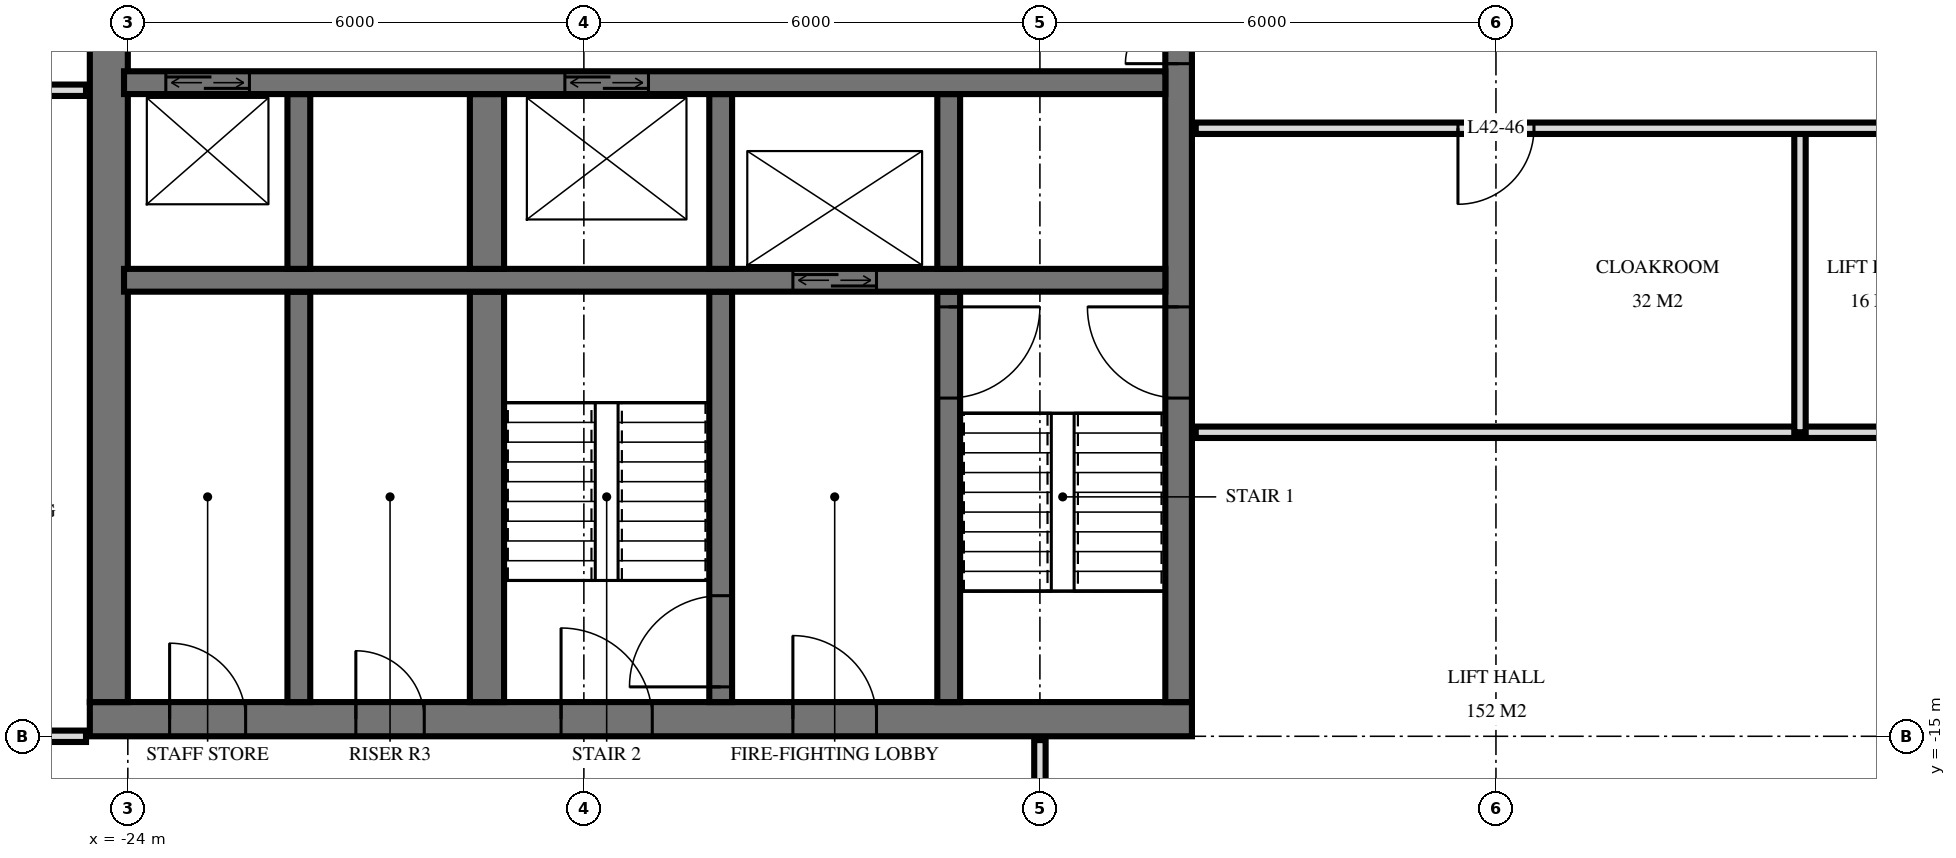
"""IFC4 building model, lengths in metres.
Left out: names, types, materials, properties, quantities, classifications, styles, units other than length and angle.
Written with IfcOpenShell. Run it as: python <this file> out.ifc"""

import sys

from ifc_helpers import new_model, si_unit, direction, frame, frame_2d, origin, place, context, subcontext, project, spatial, rectangle, extrude, element, fill, save


model = new_model("IFC4")
c1 = context("Model", 3, precision=1e-05, world=origin(), true_north=direction((0.0, 1.0)))
c2 = subcontext(c1, "Body", "Model", "MODEL_VIEW")
j1 = project(units=[si_unit("LENGTHUNIT", "METRE"), si_unit("PLANEANGLEUNIT", "RADIAN")], contexts=[c1])
p1 = place(None, origin())
s1 = spatial("IfcSite", under=j1, at=p1, CompositionType="ELEMENT")
p2 = place(p1, origin())
s2 = spatial("IfcBuilding", under=s1, at=p2, CompositionType="ELEMENT")
p3 = place(p2, frame((0.0, 0.0, 163.2)))
s3 = spatial("IfcBuildingStorey", under=s2, at=p3, CompositionType="ELEMENT", Elevation=163.2)
p4 = place(p3, frame((-24.5, -14.775, 0.0), z_axis=(0.0, 0.0, 1.0), x_axis=(1.0, 0.0, 0.0)))
e1 = element("IfcWall", 1, at=p4, inside=s3, PredefinedType="SHEAR", context=c2, shape_type="SweptSolid", body=[
    extrude(rectangle(XDim=14.5, YDim=0.45, at=frame_2d((7.25, 0.0))), origin(), (0.0, 0.0, 1.0), 3.6),
])
p5 = place(p4, frame((6.2, 0.0, 0.0)))
e2 = element("IfcOpeningElement", 2, at=p5, cuts=e1, PredefinedType="OPENING", context=c2, shape_type="SweptSolid", body=[
    extrude(rectangle(XDim=1.2, YDim=2.1, at=frame_2d((0.6, 1.05))), frame((0.0, 0.235, 0.0), z_axis=(0.0, -1.0, 0.0), x_axis=(1.0, 0.0, 0.0)), (0.0, 0.0, 1.0), 0.47),
])
p6 = place(p4, frame((9.25, 0.0, 0.0)))
e3 = element("IfcOpeningElement", 3, at=p6, cuts=e1, PredefinedType="OPENING", context=c2, shape_type="SweptSolid", body=[
    extrude(rectangle(XDim=1.1, YDim=2.1, at=frame_2d((0.55, 1.05))), frame((0.0, 0.235, 0.0), z_axis=(0.0, -1.0, 0.0), x_axis=(1.0, 0.0, 0.0)), (0.0, 0.0, 1.0), 0.47),
])
p7 = place(p4, frame((3.5, 0.0, 0.0)))
e4 = element("IfcOpeningElement", 4, at=p7, cuts=e1, PredefinedType="OPENING", context=c2, shape_type="SweptSolid", body=[
    extrude(rectangle(XDim=0.9, YDim=2.1, at=frame_2d((0.45, 1.05))), frame((0.0, 0.235, 0.0), z_axis=(0.0, -1.0, 0.0), x_axis=(1.0, 0.0, 0.0)), (0.0, 0.0, 1.0), 0.47),
])
p8 = place(p4, frame((1.05, 0.0, 0.0)))
e5 = element("IfcOpeningElement", 5, at=p8, cuts=e1, PredefinedType="OPENING", context=c2, shape_type="SweptSolid", body=[
    extrude(rectangle(XDim=1.0, YDim=2.1, at=frame_2d((0.5, 1.05))), frame((0.0, 0.235, 0.0), z_axis=(0.0, -1.0, 0.0), x_axis=(1.0, 0.0, 0.0)), (0.0, 0.0, 1.0), 0.47),
])
p9 = place(p3, frame((-10.175, -14.55, 0.0), z_axis=(0.0, 0.0, 1.0), x_axis=(0.0, 1.0, 0.0)))
e6 = element("IfcWall", 6, at=p9, inside=s3, PredefinedType="SHEAR", context=c2, shape_type="SweptSolid", body=[
    extrude(rectangle(XDim=14.1, YDim=0.35, at=frame_2d((7.05, 0.0))), origin(), (0.0, 0.0, 1.0), 3.6),
])
p10 = place(p9, frame((8.4, 0.0, 0.0)))
e7 = element("IfcOpeningElement", 7, at=p10, cuts=e6, PredefinedType="OPENING", context=c2, shape_type="SweptSolid", body=[
    extrude(rectangle(XDim=1.4, YDim=2.4, at=frame_2d((0.7, 1.2))), frame((0.0, 0.185, 0.0), z_axis=(0.0, -1.0, 0.0), x_axis=(1.0, 0.0, 0.0)), (0.0, 0.0, 1.0), 0.37),
])
p11 = place(p9, frame((10.0, 0.0, 0.0)))
e8 = element("IfcOpeningElement", 8, at=p11, cuts=e6, PredefinedType="OPENING", context=c2, shape_type="SweptSolid", body=[
    extrude(rectangle(XDim=1.4, YDim=2.4, at=frame_2d((0.7, 1.2))), frame((0.0, 0.185, 0.0), z_axis=(0.0, -1.0, 0.0), x_axis=(1.0, 0.0, 0.0)), (0.0, 0.0, 1.0), 0.37),
])
p12 = place(p9, frame((4.0, 0.0, 0.0)))
e9 = element("IfcOpeningElement", 9, at=p12, cuts=e6, PredefinedType="OPENING", context=c2, shape_type="SweptSolid", body=[
    extrude(rectangle(XDim=1.2, YDim=2.1, at=frame_2d((0.6, 1.05))), frame((0.0, 0.185, 0.0), z_axis=(0.0, -1.0, 0.0), x_axis=(1.0, 0.0, 0.0)), (0.0, 0.0, 1.0), 0.37),
])
p13 = place(p3, frame((-24.25, -14.55, 0.0), z_axis=(0.0, 0.0, 1.0), x_axis=(0.0, 1.0, 0.0)))
e10 = element("IfcWall", 10, at=p13, inside=s3, PredefinedType="SHEAR", context=c2, shape_type="SweptSolid", body=[
    extrude(rectangle(XDim=14.1, YDim=0.5, at=frame_2d((7.05, 0.0))), origin(), (0.0, 0.0, 1.0), 3.6),
])
p14 = place(p3, frame((-24.05, -6.4, 0.0), z_axis=(0.0, 0.0, 1.0), x_axis=(1.0, 0.0, 0.0)))
e11 = element("IfcWall", 11, at=p14, inside=s3, PredefinedType="SHEAR", context=c2, shape_type="SweptSolid", body=[
    extrude(rectangle(XDim=13.7, YDim=0.3, at=frame_2d((6.85, 0.0))), origin(), (0.0, 0.0, 1.0), 3.6),
])
p15 = place(p14, frame((0.55, 0.0, 0.0)))
e12 = element("IfcOpeningElement", 12, at=p15, cuts=e11, PredefinedType="OPENING", context=c2, shape_type="SweptSolid", body=[
    extrude(rectangle(XDim=1.1, YDim=2.1, at=frame_2d((0.55, 1.05))), frame((0.0, 0.16, 0.0), z_axis=(0.0, -1.0, 0.0), x_axis=(1.0, 0.0, 0.0)), (0.0, 0.0, 1.0), 0.32),
])
p16 = place(p14, frame((5.8, 0.0, 0.0)))
e13 = element("IfcOpeningElement", 13, at=p16, cuts=e11, PredefinedType="OPENING", context=c2, shape_type="SweptSolid", body=[
    extrude(rectangle(XDim=1.1, YDim=2.1, at=frame_2d((0.55, 1.05))), frame((0.0, 0.16, 0.0), z_axis=(0.0, -1.0, 0.0), x_axis=(1.0, 0.0, 0.0)), (0.0, 0.0, 1.0), 0.32),
])
p17 = place(p3, frame((-24.05, -9.0, 0.0), z_axis=(0.0, 0.0, 1.0), x_axis=(1.0, 0.0, 0.0)))
e14 = element("IfcWall", 14, at=p17, inside=s3, PredefinedType="SHEAR", context=c2, shape_type="SweptSolid", body=[
    extrude(rectangle(XDim=13.7, YDim=0.3, at=frame_2d((6.85, 0.0))), origin(), (0.0, 0.0, 1.0), 3.6),
])
p18 = place(p17, frame((8.8, 0.0, 0.0)))
e15 = element("IfcOpeningElement", 15, at=p18, cuts=e14, PredefinedType="OPENING", context=c2, shape_type="SweptSolid", body=[
    extrude(rectangle(XDim=1.1, YDim=2.1, at=frame_2d((0.55, 1.05))), frame((0.0, 0.16, 0.0), z_axis=(0.0, -1.0, 0.0), x_axis=(1.0, 0.0, 0.0)), (0.0, 0.0, 1.0), 0.32),
])
p19 = place(p3, frame((-13.2, -8.85, 0.0), z_axis=(0.0, 0.0, 1.0), x_axis=(0.0, 1.0, 0.0)))
e16 = element("IfcWall", 16, at=p19, inside=s3, PredefinedType="SHEAR", context=c2, shape_type="SweptSolid", body=[
    extrude(rectangle(XDim=2.3, YDim=0.3, at=frame_2d((1.15, 0.0))), origin(), (0.0, 0.0, 1.0), 3.6),
])
p20 = place(p3, frame((-13.2, -14.55, 0.0), z_axis=(0.0, 0.0, 1.0), x_axis=(0.0, 1.0, 0.0)))
e17 = element("IfcWall", 17, at=p20, inside=s3, PredefinedType="SHEAR", context=c2, shape_type="SweptSolid", body=[
    extrude(rectangle(XDim=5.4, YDim=0.3, at=frame_2d((2.7, 0.0))), origin(), (0.0, 0.0, 1.0), 3.6),
])
p21 = place(p20, frame((4.0, 0.0, 0.0)))
e18 = element("IfcOpeningElement", 18, at=p21, cuts=e17, PredefinedType="OPENING", context=c2, shape_type="SweptSolid", body=[
    extrude(rectangle(XDim=1.2, YDim=2.1, at=frame_2d((0.6, 1.05))), frame((0.0, 0.16, 0.0), z_axis=(0.0, -1.0, 0.0), x_axis=(1.0, 0.0, 0.0)), (0.0, 0.0, 1.0), 0.32),
])
p22 = place(p3, frame((-16.2, -8.85, 0.0), z_axis=(0.0, 0.0, 1.0), x_axis=(0.0, 1.0, 0.0)))
e19 = element("IfcWall", 19, at=p22, inside=s3, PredefinedType="SHEAR", context=c2, shape_type="SweptSolid", body=[
    extrude(rectangle(XDim=2.3, YDim=0.3, at=frame_2d((1.15, 0.0))), origin(), (0.0, 0.0, 1.0), 3.6),
])
p23 = place(p3, frame((-16.2, -14.55, 0.0), z_axis=(0.0, 0.0, 1.0), x_axis=(0.0, 1.0, 0.0)))
e20 = element("IfcWall", 20, at=p23, inside=s3, PredefinedType="SHEAR", context=c2, shape_type="SweptSolid", body=[
    extrude(rectangle(XDim=5.4, YDim=0.3, at=frame_2d((2.7, 0.0))), origin(), (0.0, 0.0, 1.0), 3.6),
])
p24 = place(p23, frame((0.2, 0.0, 0.0)))
e21 = element("IfcOpeningElement", 21, at=p24, cuts=e20, PredefinedType="OPENING", context=c2, shape_type="SweptSolid", body=[
    extrude(rectangle(XDim=1.2, YDim=2.1, at=frame_2d((0.6, 1.05))), frame((0.0, 0.16, 0.0), z_axis=(0.0, -1.0, 0.0), x_axis=(1.0, 0.0, 0.0)), (0.0, 0.0, 1.0), 0.32),
])
p25 = place(p3, frame((-19.275, -8.85, 0.0), z_axis=(0.0, 0.0, 1.0), x_axis=(0.0, 1.0, 0.0)))
e22 = element("IfcWall", 22, at=p25, inside=s3, PredefinedType="SHEAR", context=c2, shape_type="SweptSolid", body=[
    extrude(rectangle(XDim=2.3, YDim=0.45, at=frame_2d((1.15, 0.0))), origin(), (0.0, 0.0, 1.0), 3.6),
])
p26 = place(p3, frame((-19.275, -14.55, 0.0), z_axis=(0.0, 0.0, 1.0), x_axis=(0.0, 1.0, 0.0)))
e23 = element("IfcWall", 23, at=p26, inside=s3, PredefinedType="SHEAR", context=c2, shape_type="SweptSolid", body=[
    extrude(rectangle(XDim=5.4, YDim=0.45, at=frame_2d((2.7, 0.0))), origin(), (0.0, 0.0, 1.0), 3.6),
])
p27 = place(p3, frame((-21.75, -8.85, 0.0), z_axis=(0.0, 0.0, 1.0), x_axis=(0.0, 1.0, 0.0)))
e24 = element("IfcWall", 24, at=p27, inside=s3, PredefinedType="SHEAR", context=c2, shape_type="SweptSolid", body=[
    extrude(rectangle(XDim=2.3, YDim=0.3, at=frame_2d((1.15, 0.0))), origin(), (0.0, 0.0, 1.0), 3.6),
])
p28 = place(p3, frame((-21.75, -14.55, 0.0), z_axis=(0.0, 0.0, 1.0), x_axis=(0.0, 1.0, 0.0)))
e25 = element("IfcWall", 25, at=p28, inside=s3, PredefinedType="SHEAR", context=c2, shape_type="SweptSolid", body=[
    extrude(rectangle(XDim=5.4, YDim=0.3, at=frame_2d((2.7, 0.0))), origin(), (0.0, 0.0, 1.0), 3.6),
])
p29 = place(p3, frame((-2.0, -11.0, 0.0), z_axis=(0.0, 0.0, 1.0), x_axis=(0.0, 1.0, 0.0)))
e26 = element("IfcWall", 26, at=p29, inside=s3, PredefinedType="PARTITIONING", context=c2, shape_type="SweptSolid", body=[
    extrude(rectangle(XDim=4.0, YDim=0.15, at=frame_2d((2.0, 0.0))), origin(), (0.0, 0.0, 1.0), 3.32),
])
p30 = place(p3, frame((-12.0, -21.0, 0.0), z_axis=(0.0, 0.0, 1.0), x_axis=(0.0, 1.0, 0.0)))
e27 = element("IfcWall", 27, at=p30, inside=s3, PredefinedType="PARTITIONING", context=c2, shape_type="SweptSolid", body=[
    extrude(rectangle(XDim=5.95, YDim=0.15, at=frame_2d((2.975, 0.0))), origin(), (0.0, 0.0, 1.0), 3.32),
])
p31 = place(p30, frame((4.0, 0.0, 0.0)))
e28 = element("IfcOpeningElement", 28, at=p31, cuts=e27, PredefinedType="OPENING", context=c2, shape_type="SweptSolid", body=[
    extrude(rectangle(XDim=1.0, YDim=2.1, at=frame_2d((0.5, 1.05))), frame((0.0, 0.085, 0.0), z_axis=(0.0, -1.0, 0.0), x_axis=(1.0, 0.0, 0.0)), (0.0, 0.0, 1.0), 0.17),
])
p32 = place(p3, frame((-28.02, -15.0, 0.0), z_axis=(0.0, 0.0, 1.0), x_axis=(1.0, 0.0, 0.0)))
e29 = element("IfcWall", 29, at=p32, inside=s3, PredefinedType="PARTITIONING", context=c2, shape_type="SweptSolid", body=[
    extrude(rectangle(XDim=3.47, YDim=0.15, at=frame_2d((1.735, 0.0))), origin(), (0.0, 0.0, 1.0), 3.32),
])
p33 = place(p32, frame((1.57, 0.0, 0.0)))
e30 = element("IfcOpeningElement", 30, at=p33, cuts=e29, PredefinedType="OPENING", context=c2, shape_type="SweptSolid", body=[
    extrude(rectangle(XDim=1.0, YDim=2.1, at=frame_2d((0.5, 1.05))), frame((0.0, 0.085, 0.0), z_axis=(0.0, -1.0, 0.0), x_axis=(1.0, 0.0, 0.0)), (0.0, 0.0, 1.0), 0.17),
])
p34 = place(p3, frame((-9.95, -11.0, 0.0), z_axis=(0.0, 0.0, 1.0), x_axis=(1.0, 0.0, 0.0)))
e31 = element("IfcWall", 31, at=p34, inside=s3, PredefinedType="PARTITIONING", context=c2, shape_type="SweptSolid", body=[
    extrude(rectangle(XDim=19.9, YDim=0.15, at=frame_2d((9.95, 0.0))), origin(), (0.0, 0.0, 1.0), 3.32),
])
p35 = place(p34, frame((9.45, 0.0, 0.0)))
e32 = element("IfcOpeningElement", 32, at=p35, cuts=e31, PredefinedType="OPENING", context=c2, shape_type="SweptSolid", body=[
    extrude(rectangle(XDim=1.0, YDim=2.1, at=frame_2d((0.5, 1.05))), frame((0.0, 0.085, 0.0), z_axis=(0.0, -1.0, 0.0), x_axis=(1.0, 0.0, 0.0)), (0.0, 0.0, 1.0), 0.17),
])
p36 = place(p34, frame((15.45, 0.0, 0.0)))
e33 = element("IfcOpeningElement", 33, at=p36, cuts=e31, PredefinedType="OPENING", context=c2, shape_type="SweptSolid", body=[
    extrude(rectangle(XDim=1.0, YDim=2.1, at=frame_2d((0.5, 1.05))), frame((0.0, 0.085, 0.0), z_axis=(0.0, -1.0, 0.0), x_axis=(1.0, 0.0, 0.0)), (0.0, 0.0, 1.0), 0.17),
])
p37 = place(p3, frame((-9.95, -7.0, 0.0), z_axis=(0.0, 0.0, 1.0), x_axis=(1.0, 0.0, 0.0)))
e34 = element("IfcWall", 34, at=p37, inside=s3, PredefinedType="PARTITIONING", context=c2, shape_type="SweptSolid", body=[
    extrude(rectangle(XDim=19.9, YDim=0.15, at=frame_2d((9.95, 0.0))), origin(), (0.0, 0.0, 1.0), 3.32),
])
p38 = place(p37, frame((9.45, 0.0, 0.0)))
e35 = element("IfcOpeningElement", 35, at=p38, cuts=e34, PredefinedType="OPENING", context=c2, shape_type="SweptSolid", body=[
    extrude(rectangle(XDim=1.0, YDim=2.1, at=frame_2d((0.5, 1.05))), frame((0.0, 0.085, 0.0), z_axis=(0.0, -1.0, 0.0), x_axis=(1.0, 0.0, 0.0)), (0.0, 0.0, 1.0), 0.17),
])
p39 = place(p37, frame((3.45, 0.0, 0.0)))
e36 = element("IfcOpeningElement", 36, at=p39, cuts=e34, PredefinedType="OPENING", context=c2, shape_type="SweptSolid", body=[
    extrude(rectangle(XDim=1.0, YDim=2.1, at=frame_2d((0.5, 1.05))), frame((0.0, 0.085, 0.0), z_axis=(0.0, -1.0, 0.0), x_axis=(1.0, 0.0, 0.0)), (0.0, 0.0, 1.0), 0.17),
])
p40 = place(p3, frame((-28.02, -6.5, 0.0), z_axis=(0.0, 0.0, 1.0), x_axis=(1.0, 0.0, 0.0)))
e37 = element("IfcWall", 37, at=p40, inside=s3, PredefinedType="PARTITIONING", context=c2, shape_type="SweptSolid", body=[
    extrude(rectangle(XDim=3.47, YDim=0.15, at=frame_2d((1.735, 0.0))), origin(), (0.0, 0.0, 1.0), 3.32),
])
p41 = place(p40, frame((1.22, 0.0, 0.0)))
e38 = element("IfcOpeningElement", 38, at=p41, cuts=e37, PredefinedType="OPENING", context=c2, shape_type="SweptSolid", body=[
    extrude(rectangle(XDim=0.9, YDim=2.1, at=frame_2d((0.45, 1.05))), frame((0.0, 0.085, 0.0), z_axis=(0.0, -1.0, 0.0), x_axis=(1.0, 0.0, 0.0)), (0.0, 0.0, 1.0), 0.17),
])
p42 = place(p15, origin())
e39 = element("IfcDoor", 39, at=p42, inside=s3, OperationType="DOUBLE_DOOR_SLIDING", PredefinedType="USERDEFINED", context=c2, shape_type="SweptSolid", body=[
    extrude(rectangle(XDim=1.1, YDim=2.1, at=frame_2d((0.55, 1.05))), frame((0.0, 0.025, 0.0), z_axis=(0.0, -1.0, 0.0), x_axis=(1.0, 0.0, 0.0)), (0.0, 0.0, 1.0), 0.05),
])
fill(e12, e39)
p43 = place(p18, origin())
e40 = element("IfcDoor", 40, at=p43, inside=s3, OperationType="DOUBLE_DOOR_SLIDING", PredefinedType="USERDEFINED", context=c2, shape_type="SweptSolid", body=[
    extrude(rectangle(XDim=1.1, YDim=2.1, at=frame_2d((0.55, 1.05))), frame((0.0, 0.025, 0.0), z_axis=(0.0, -1.0, 0.0), x_axis=(1.0, 0.0, 0.0)), (0.0, 0.0, 1.0), 0.05),
])
fill(e15, e40)
p44 = place(p16, origin())
e41 = element("IfcDoor", 41, at=p44, inside=s3, OperationType="DOUBLE_DOOR_SLIDING", PredefinedType="USERDEFINED", context=c2, shape_type="SweptSolid", body=[
    extrude(rectangle(XDim=1.1, YDim=2.1, at=frame_2d((0.55, 1.05))), frame((0.0, 0.025, 0.0), z_axis=(0.0, -1.0, 0.0), x_axis=(1.0, 0.0, 0.0)), (0.0, 0.0, 1.0), 0.05),
])
fill(e13, e41)
p45 = place(p10, origin())
e42 = element("IfcDoor", 42, at=p45, inside=s3, OperationType="DOUBLE_DOOR_SINGLE_SWING", PredefinedType="DOOR", context=c2, shape_type="SweptSolid", body=[
    extrude(rectangle(XDim=1.4, YDim=2.4, at=frame_2d((0.7, 1.2))), frame((0.0, 0.025, 0.0), z_axis=(0.0, -1.0, 0.0), x_axis=(1.0, 0.0, 0.0)), (0.0, 0.0, 1.0), 0.05),
])
fill(e7, e42)
p46 = place(p12, origin())
e43 = element("IfcDoor", 43, at=p46, inside=s3, OperationType="SINGLE_SWING_LEFT", PredefinedType="DOOR", context=c2, shape_type="SweptSolid", body=[
    extrude(rectangle(XDim=1.2, YDim=2.1, at=frame_2d((0.6, 1.05))), frame((0.0, 0.025, 0.0), z_axis=(0.0, -1.0, 0.0), x_axis=(1.0, 0.0, 0.0)), (0.0, 0.0, 1.0), 0.05),
])
fill(e9, e43)
p47 = place(p5, origin())
e44 = element("IfcDoor", 44, at=p47, inside=s3, OperationType="SINGLE_SWING_RIGHT", PredefinedType="DOOR", context=c2, shape_type="SweptSolid", body=[
    extrude(rectangle(XDim=1.2, YDim=2.1, at=frame_2d((0.6, 1.05))), frame((0.0, 0.025, 0.0), z_axis=(0.0, -1.0, 0.0), x_axis=(1.0, 0.0, 0.0)), (0.0, 0.0, 1.0), 0.05),
])
fill(e2, e44)
p48 = place(p6, origin())
e45 = element("IfcDoor", 45, at=p48, inside=s3, OperationType="SINGLE_SWING_RIGHT", PredefinedType="DOOR", context=c2, shape_type="SweptSolid", body=[
    extrude(rectangle(XDim=1.1, YDim=2.1, at=frame_2d((0.55, 1.05))), frame((0.0, 0.025, 0.0), z_axis=(0.0, -1.0, 0.0), x_axis=(1.0, 0.0, 0.0)), (0.0, 0.0, 1.0), 0.05),
])
fill(e3, e45)
p49 = place(p7, origin())
e46 = element("IfcDoor", 46, at=p49, inside=s3, OperationType="SINGLE_SWING_RIGHT", PredefinedType="DOOR", context=c2, shape_type="SweptSolid", body=[
    extrude(rectangle(XDim=0.9, YDim=2.1, at=frame_2d((0.45, 1.05))), frame((0.0, 0.025, 0.0), z_axis=(0.0, -1.0, 0.0), x_axis=(1.0, 0.0, 0.0)), (0.0, 0.0, 1.0), 0.05),
])
fill(e4, e46)
p50 = place(p8, origin())
e47 = element("IfcDoor", 47, at=p50, inside=s3, OperationType="SINGLE_SWING_RIGHT", PredefinedType="DOOR", context=c2, shape_type="SweptSolid", body=[
    extrude(rectangle(XDim=1.0, YDim=2.1, at=frame_2d((0.5, 1.05))), frame((0.0, 0.025, 0.0), z_axis=(0.0, -1.0, 0.0), x_axis=(1.0, 0.0, 0.0)), (0.0, 0.0, 1.0), 0.05),
])
fill(e5, e47)
p51 = place(p21, frame((0.6, 0.0, 0.0), z_axis=(0.0, 0.0, 1.0), x_axis=(-1.0, 0.0, 0.0)))
e48 = element("IfcDoor", 48, at=p51, inside=s3, OperationType="SINGLE_SWING_RIGHT", PredefinedType="DOOR", context=c2, shape_type="SweptSolid", body=[
    extrude(rectangle(XDim=1.2, YDim=2.1, at=frame_2d((0.0, 1.05))), frame((0.0, -0.025, 0.0), z_axis=(0.0, 1.0, 0.0), x_axis=(-1.0, 0.0, 0.0)), (0.0, 0.0, 1.0), 0.05),
])
fill(e18, e48)
p52 = place(p24, origin())
e49 = element("IfcDoor", 49, at=p52, inside=s3, OperationType="SINGLE_SWING_RIGHT", PredefinedType="DOOR", context=c2, shape_type="SweptSolid", body=[
    extrude(rectangle(XDim=1.2, YDim=2.1, at=frame_2d((0.6, 1.05))), frame((0.0, 0.025, 0.0), z_axis=(0.0, -1.0, 0.0), x_axis=(1.0, 0.0, 0.0)), (0.0, 0.0, 1.0), 0.05),
])
fill(e21, e49)
p53 = place(p39, frame((0.5, 0.0, 0.0), z_axis=(0.0, 0.0, 1.0), x_axis=(-1.0, 0.0, 0.0)))
e50 = element("IfcDoor", 50, at=p53, inside=s3, OperationType="SINGLE_SWING_LEFT", PredefinedType="DOOR", context=c2, shape_type="SweptSolid", body=[
    extrude(rectangle(XDim=1.0, YDim=2.1, at=frame_2d((0.0, 1.05))), frame((0.0, -0.025, 0.0), z_axis=(0.0, 1.0, 0.0), x_axis=(-1.0, 0.0, 0.0)), (0.0, 0.0, 1.0), 0.05),
])
fill(e36, e50)
save(model, sys.argv[1])
